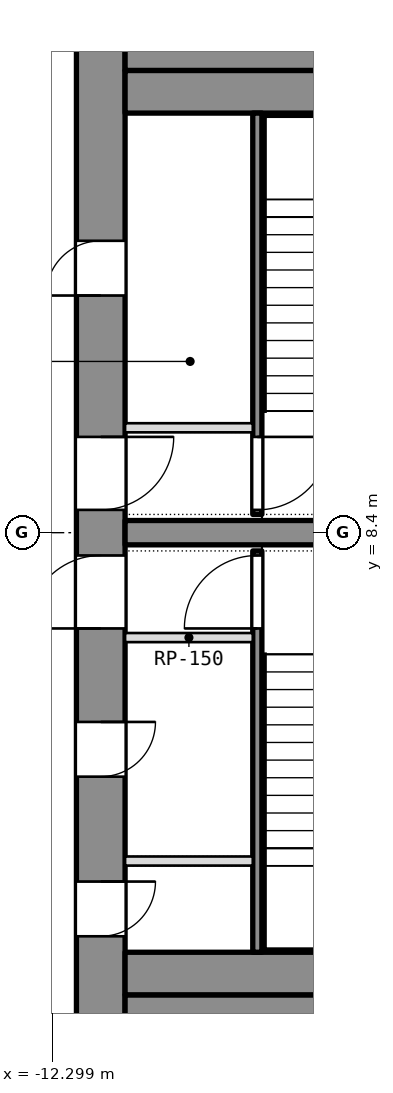
"""IFC4 building model, lengths in metres.
Left out: names, types, materials, properties, quantities, classifications, styles, units other than length and angle.
Written with IfcOpenShell. Run it as: python <this file> out.ifc"""

import sys

from ifc_helpers import new_model, si_unit, direction, frame, frame_2d, origin, place, context, subcontext, project, spatial, rectangle, extrude, element, fill, save


model = new_model("IFC4")
c1 = context("Model", 3, precision=1e-05, world=origin(), true_north=direction((0.0, 1.0)))
c2 = subcontext(c1, "Body", "Model", "MODEL_VIEW")
j1 = project(units=[si_unit("LENGTHUNIT", "METRE"), si_unit("PLANEANGLEUNIT", "RADIAN")], contexts=[c1])
p1 = place(None, origin())
s1 = spatial("IfcSite", under=j1, at=p1, CompositionType="ELEMENT")
p2 = place(p1, origin())
s2 = spatial("IfcBuilding", under=s1, at=p2, CompositionType="ELEMENT")
p3 = place(p2, frame((0.0, 0.0, 212.9)))
s3 = spatial("IfcBuildingStorey", under=s2, at=p3, CompositionType="ELEMENT", Elevation=212.9)
p4 = place(p3, frame((-11.5, 0.0, 0.0), z_axis=(0.0, 0.0, 1.0), x_axis=(0.0, 1.0, 0.0)))
e1 = element("IfcWall", 1, at=p4, inside=s3, PredefinedType="SHEAR", context=c2, shape_type="SweptSolid", body=[
    extrude(rectangle(XDim=16.8, YDim=0.8, at=frame_2d((8.4, 0.0))), origin(), (0.0, 0.0, 1.0), 3.6),
])
p5 = place(p4, frame((1.762, 0.0, 0.0)))
e2 = element("IfcOpeningElement", 2, at=p5, cuts=e1, PredefinedType="OPENING", context=c2, shape_type="SweptSolid", body=[
    extrude(rectangle(XDim=0.9, YDim=2.1, at=frame_2d((0.45, 1.05))), frame((0.0, 0.4, 0.0), z_axis=(0.0, -1.0, 0.0), x_axis=(1.0, 0.0, 0.0)), (0.0, 0.0, 1.0), 0.8),
])
p6 = place(p4, frame((4.387, 0.0, 0.0)))
e3 = element("IfcOpeningElement", 3, at=p6, cuts=e1, PredefinedType="OPENING", context=c2, shape_type="SweptSolid", body=[
    extrude(rectangle(XDim=0.9, YDim=2.1, at=frame_2d((0.45, 1.05))), frame((0.0, 0.4, 0.0), z_axis=(0.0, -1.0, 0.0), x_axis=(1.0, 0.0, 0.0)), (0.0, 0.0, 1.0), 0.8),
])
p7 = place(p4, frame((6.825, 0.0, 0.0)))
e4 = element("IfcOpeningElement", 4, at=p7, cuts=e1, PredefinedType="OPENING", context=c2, shape_type="SweptSolid", body=[
    extrude(rectangle(XDim=1.2, YDim=2.1, at=frame_2d((0.6, 1.05))), frame((0.0, 0.4, 0.0), z_axis=(0.0, -1.0, 0.0), x_axis=(1.0, 0.0, 0.0)), (0.0, 0.0, 1.0), 0.8),
])
p8 = place(p4, frame((12.3, 0.0, 0.0)))
e5 = element("IfcOpeningElement", 5, at=p8, cuts=e1, PredefinedType="OPENING", context=c2, shape_type="SweptSolid", body=[
    extrude(rectangle(XDim=0.9, YDim=2.1, at=frame_2d((0.45, 1.05))), frame((0.0, 0.4, 0.0), z_axis=(0.0, -1.0, 0.0), x_axis=(1.0, 0.0, 0.0)), (0.0, 0.0, 1.0), 0.8),
])
p9 = place(p4, frame((8.775, 0.0, 0.0)))
e6 = element("IfcOpeningElement", 6, at=p9, cuts=e1, PredefinedType="OPENING", context=c2, shape_type="SweptSolid", body=[
    extrude(rectangle(XDim=1.2, YDim=2.1, at=frame_2d((0.6, 1.05))), frame((0.0, 0.4, 0.0), z_axis=(0.0, -1.0, 0.0), x_axis=(1.0, 0.0, 0.0)), (0.0, 0.0, 1.0), 0.8),
])
for number, where, z_axis, x_axis in (
    (7, (-11.1, 0.4, 0.0), (0.0, 0.0, 1.0), (1.0, 0.0, 0.0)),
    (8, (-11.1, 16.4, 0.0), (0.0, 0.0, 1.0), (1.0, 0.0, 0.0)),
):
    element("IfcWall", number, at=place(p3, frame(where, z_axis=z_axis, x_axis=x_axis)), inside=s3, PredefinedType="SHEAR", context=c2, shape_type="SweptSolid", body=[
        extrude(rectangle(XDim=22.2, YDim=0.8, at=frame_2d((11.1, 0.0))), origin(), (0.0, 0.0, 1.0), 3.6),
    ])
p10 = place(p3, frame((-11.1, 8.4, 0.0), z_axis=(0.0, 0.0, 1.0), x_axis=(1.0, 0.0, 0.0)))
e9 = element("IfcWall", 9, at=p10, inside=s3, PredefinedType="SHEAR", context=c2, shape_type="SweptSolid", body=[
    extrude(rectangle(XDim=6.7, YDim=0.4, at=frame_2d((3.35, 0.0))), origin(), (0.0, 0.0, 1.0), 3.6),
])
for number, where, z_axis, x_axis in (
    (10, (-11.1, 1.15, 0.0), (0.0, 0.0, 1.0), (1.0, 0.0, 0.0)),
    (11, (-11.1, 15.65, 0.0), (0.0, 0.0, 1.0), (1.0, 0.0, 0.0)),
):
    element("IfcWall", number, at=place(p3, frame(where, z_axis=z_axis, x_axis=x_axis)), inside=s3, PredefinedType="PARTITIONING", context=c2, shape_type="SweptSolid", body=[
        extrude(rectangle(XDim=22.2, YDim=0.7, at=frame_2d((11.1, 0.0))), origin(), (0.0, 0.0, 1.0), 3.34),
    ])
p11 = place(p3, frame((-8.925, 1.5, 0.0), z_axis=(0.0, 0.0, 1.0), x_axis=(0.0, 1.0, 0.0)))
e12 = element("IfcWall", 12, at=p11, inside=s3, PredefinedType="SHEAR", context=c2, shape_type="SweptSolid", body=[
    extrude(rectangle(XDim=6.6, YDim=0.15, at=frame_2d((3.3, 0.0))), origin(), (0.0, 0.0, 1.0), 3.34),
])
p12 = place(p11, frame((5.325, 0.0, 0.0)))
e13 = element("IfcOpeningElement", 13, at=p12, cuts=e12, PredefinedType="OPENING", context=c2, shape_type="SweptSolid", body=[
    extrude(rectangle(XDim=1.2, YDim=2.1, at=frame_2d((0.6, 1.05))), frame((0.0, 0.075, 0.0), z_axis=(0.0, -1.0, 0.0), x_axis=(1.0, 0.0, 0.0)), (0.0, 0.0, 1.0), 0.15),
])
for number, where, z_axis, x_axis in (
    (14, (-11.1, 6.675, 0.0), (0.0, 0.0, 1.0), (1.0, 0.0, 0.0)),
    (15, (-11.1, 3.0, 0.0), (0.0, 0.0, 1.0), (1.0, 0.0, 0.0)),
):
    element("IfcWall", number, at=place(p3, frame(where, z_axis=z_axis, x_axis=x_axis)), inside=s3, PredefinedType="PARTITIONING", context=c2, shape_type="SweptSolid", body=[
        extrude(rectangle(XDim=2.1, YDim=0.15, at=frame_2d((1.05, 0.0))), origin(), (0.0, 0.0, 1.0), 3.34),
    ])
p13 = place(p3, frame((-8.925, 8.7, 0.0), z_axis=(0.0, 0.0, 1.0), x_axis=(0.0, 1.0, 0.0)))
e16 = element("IfcWall", 16, at=p13, inside=s3, PredefinedType="SHEAR", context=c2, shape_type="SweptSolid", body=[
    extrude(rectangle(XDim=6.6, YDim=0.15, at=frame_2d((3.3, 0.0))), origin(), (0.0, 0.0, 1.0), 3.34),
])
p14 = place(p13, frame((0.075, 0.0, 0.0)))
e17 = element("IfcOpeningElement", 17, at=p14, cuts=e16, PredefinedType="OPENING", context=c2, shape_type="SweptSolid", body=[
    extrude(rectangle(XDim=1.2, YDim=2.1, at=frame_2d((0.6, 1.05))), frame((0.0, 0.075, 0.0), z_axis=(0.0, -1.0, 0.0), x_axis=(1.0, 0.0, 0.0)), (0.0, 0.0, 1.0), 0.15),
])
p15 = place(p3, frame((-11.1, 10.125, 0.0), z_axis=(0.0, 0.0, 1.0), x_axis=(1.0, 0.0, 0.0)))
e18 = element("IfcWall", 18, at=p15, inside=s3, PredefinedType="PARTITIONING", context=c2, shape_type="SweptSolid", body=[
    extrude(rectangle(XDim=2.1, YDim=0.15, at=frame_2d((1.05, 0.0))), origin(), (0.0, 0.0, 1.0), 3.34),
])
p16 = place(p5, origin())
e19 = element("IfcDoor", 19, at=p16, inside=s3, OperationType="SINGLE_SWING_LEFT", PredefinedType="DOOR", context=c2, shape_type="SweptSolid", body=[
    extrude(rectangle(XDim=0.9, YDim=2.1, at=frame_2d((0.45, 1.05))), frame((0.0, 0.025, 0.0), z_axis=(0.0, -1.0, 0.0), x_axis=(1.0, 0.0, 0.0)), (0.0, 0.0, 1.0), 0.05),
])
fill(e2, e19)
p17 = place(p6, origin())
e20 = element("IfcDoor", 20, at=p17, inside=s3, OperationType="SINGLE_SWING_LEFT", PredefinedType="DOOR", context=c2, shape_type="SweptSolid", body=[
    extrude(rectangle(XDim=0.9, YDim=2.1, at=frame_2d((0.45, 1.05))), frame((0.0, 0.025, 0.0), z_axis=(0.0, -1.0, 0.0), x_axis=(1.0, 0.0, 0.0)), (0.0, 0.0, 1.0), 0.05),
])
fill(e3, e20)
p18 = place(p7, origin())
e21 = element("IfcDoor", 21, at=p18, inside=s3, OperationType="SINGLE_SWING_LEFT", PredefinedType="DOOR", context=c2, shape_type="SweptSolid", body=[
    extrude(rectangle(XDim=1.2, YDim=2.1, at=frame_2d((0.6, 1.05))), frame((0.0, 0.025, 0.0), z_axis=(0.0, -1.0, 0.0), x_axis=(1.0, 0.0, 0.0)), (0.0, 0.0, 1.0), 0.05),
])
fill(e4, e21)
p19 = place(p12, origin())
e22 = element("IfcDoor", 22, at=p19, inside=s3, OperationType="SINGLE_SWING_LEFT", PredefinedType="DOOR", context=c2, shape_type="SweptSolid", body=[
    extrude(rectangle(XDim=1.2, YDim=2.1, at=frame_2d((0.6, 1.05))), frame((0.0, 0.025, 0.0), z_axis=(0.0, -1.0, 0.0), x_axis=(1.0, 0.0, 0.0)), (0.0, 0.0, 1.0), 0.05),
])
fill(e13, e22)
p20 = place(p8, origin())
e23 = element("IfcDoor", 23, at=p20, inside=s3, OperationType="SINGLE_SWING_LEFT", PredefinedType="DOOR", context=c2, shape_type="SweptSolid", body=[
    extrude(rectangle(XDim=0.9, YDim=2.1, at=frame_2d((0.45, 1.05))), frame((0.0, 0.025, 0.0), z_axis=(0.0, -1.0, 0.0), x_axis=(1.0, 0.0, 0.0)), (0.0, 0.0, 1.0), 0.05),
])
fill(e5, e23)
p21 = place(p9, origin())
e24 = element("IfcDoor", 24, at=p21, inside=s3, OperationType="SINGLE_SWING_LEFT", PredefinedType="DOOR", context=c2, shape_type="SweptSolid", body=[
    extrude(rectangle(XDim=1.2, YDim=2.1, at=frame_2d((0.6, 1.05))), frame((0.0, 0.025, 0.0), z_axis=(0.0, -1.0, 0.0), x_axis=(1.0, 0.0, 0.0)), (0.0, 0.0, 1.0), 0.05),
])
fill(e6, e24)
p22 = place(p14, origin())
e25 = element("IfcDoor", 25, at=p22, inside=s3, OperationType="SINGLE_SWING_LEFT", PredefinedType="DOOR", context=c2, shape_type="SweptSolid", body=[
    extrude(rectangle(XDim=1.2, YDim=2.1, at=frame_2d((0.6, 1.05))), frame((0.0, 0.025, 0.0), z_axis=(0.0, -1.0, 0.0), x_axis=(1.0, 0.0, 0.0)), (0.0, 0.0, 1.0), 0.05),
])
fill(e17, e25)
save(model, sys.argv[1])
